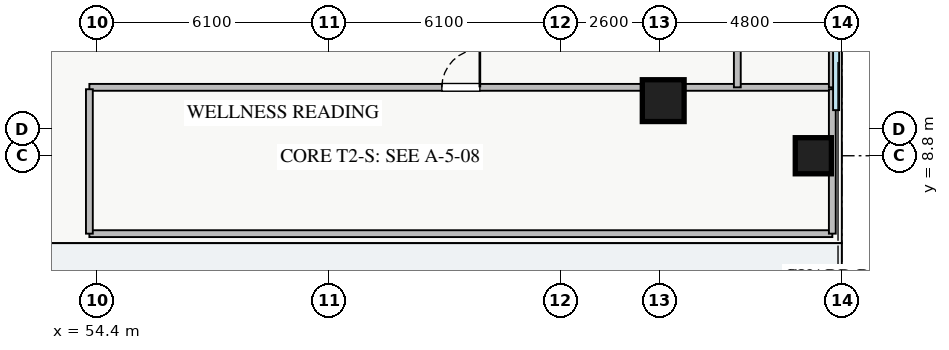
"""IFC4 building model, lengths in metres.
Left out: names, types, materials, properties, quantities, classifications, styles, units other than length and angle.
Written with IfcOpenShell. Run it as: python <this file> out.ifc"""

import sys

from ifc_helpers import new_model, si_unit, direction, frame, frame_2d, origin, origin_2d, place, context, subcontext, project, spatial, rectangle, extrude, source, transform, mapped, element, fill, save


model = new_model("IFC4")
c1 = context("Model", 3, precision=1e-05, world=origin(), true_north=direction((0.0, 1.0)))
c2 = subcontext(c1, "Body", "Model", "MODEL_VIEW")
j1 = project(units=[si_unit("LENGTHUNIT", "METRE"), si_unit("PLANEANGLEUNIT", "RADIAN")], contexts=[c1])
p1 = place(None, origin())
s1 = spatial("IfcSite", under=j1, at=p1, CompositionType="ELEMENT")
p2 = place(p1, origin())
s2 = spatial("IfcBuilding", under=s1, at=p2, CompositionType="ELEMENT")
p3 = place(p2, frame((0.0, 0.0, 18.2)))
s3 = spatial("IfcBuildingStorey", under=s2, at=p3, CompositionType="ELEMENT", Elevation=18.2)
m1 = source(origin(), c2, "Body", "SweptSolid", [
    extrude(rectangle(XDim=1.1, YDim=1.1, at=origin_2d()), origin(), (0.0, 0.0, 1.0), 4.8),
])
p4 = place(p3, frame((69.3, 10.25, 0.0), z_axis=(0.0, 0.0, 1.0), x_axis=(1.0, 0.0, 0.0)))
e1 = element("IfcColumn", 1, at=p4, inside=s3, PredefinedType="COLUMN", context=c2, shape_type="MappedRepresentation", body=[
    mapped(m1, transform((0.0, 0.0, 0.0), x_axis=(1.0, 0.0, 0.0), y_axis=(0.0, 1.0, 0.0), z_axis=(0.0, 0.0, 1.0), scale=1.0)),
])
m2 = source(origin(), c2, "Body", "SweptSolid", [
    extrude(rectangle(XDim=0.95, YDim=0.95, at=origin_2d()), origin(), (0.0, 0.0, 1.0), 4.8),
])
p5 = place(p3, frame((73.25, 8.8, 0.0), z_axis=(0.0, 0.0, 1.0), x_axis=(1.0, 0.0, 0.0)))
e2 = element("IfcColumn", 2, at=p5, inside=s3, PredefinedType="COLUMN", context=c2, shape_type="MappedRepresentation", body=[
    mapped(m2, transform((0.0, 0.0, 0.0), x_axis=(1.0, 0.0, 0.0), y_axis=(0.0, 1.0, 0.0), z_axis=(0.0, 0.0, 1.0), scale=1.0)),
])
p6 = place(p3, frame((54.2, 10.6, 0.0), z_axis=(0.0, 0.0, 1.0), x_axis=(1.0, 0.0, 0.0)))
e3 = element("IfcWall", 3, at=p6, inside=s3, PredefinedType="PARTITIONING", context=c2, shape_type="SweptSolid", body=[
    extrude(rectangle(XDim=19.55, YDim=0.18, at=frame_2d((9.775, 0.0))), origin(), (0.0, 0.0, 1.0), 4.62),
])
p7 = place(p6, frame((9.275, 0.0, 0.0)))
e4 = element("IfcOpeningElement", 4, at=p7, cuts=e3, PredefinedType="OPENING", context=c2, shape_type="SweptSolid", body=[
    extrude(rectangle(XDim=1.0, YDim=2.05, at=frame_2d((0.5, 1.025))), frame((0.0, 0.1, 0.0), z_axis=(0.0, -1.0, 0.0), x_axis=(1.0, 0.0, 0.0)), (0.0, 0.0, 1.0), 0.2),
])
p8 = place(p3, frame((71.25, 10.6, 0.0), z_axis=(0.0, 0.0, 1.0), x_axis=(0.0, 1.0, 0.0)))
e5 = element("IfcWall", 5, at=p8, inside=s3, PredefinedType="PARTITIONING", context=c2, shape_type="SweptSolid", body=[
    extrude(rectangle(XDim=24.8, YDim=0.18, at=frame_2d((12.4, 0.0))), origin(), (0.0, 0.0, 1.0), 4.62),
])
p9 = place(p8, frame((11.9, 0.0, 0.0)))
e6 = element("IfcOpeningElement", 6, at=p9, cuts=e5, PredefinedType="OPENING", context=c2, shape_type="SweptSolid", body=[
    extrude(rectangle(XDim=1.0, YDim=2.05, at=frame_2d((0.5, 1.025))), frame((0.0, 0.1, 0.0), z_axis=(0.0, -1.0, 0.0), x_axis=(1.0, 0.0, 0.0)), (0.0, 0.0, 1.0), 0.2),
])
p10 = place(p3, frame((73.75, 10.6, 0.0), z_axis=(0.0, 0.0, 1.0), x_axis=(0.0, 1.0, 0.0)))
e7 = element("IfcWall", 7, at=p10, inside=s3, PredefinedType="PARTITIONING", context=c2, shape_type="SweptSolid", body=[
    extrude(rectangle(XDim=24.8, YDim=0.18, at=frame_2d((12.4, 0.0))), origin(), (0.0, 0.0, 1.0), 4.62),
])
p11 = place(p3, frame((54.2, 6.75, 0.0), z_axis=(0.0, 0.0, 1.0), x_axis=(1.0, 0.0, 0.0)))
e8 = element("IfcWall", 8, at=p11, inside=s3, PredefinedType="PARTITIONING", context=c2, shape_type="SweptSolid", body=[
    extrude(rectangle(XDim=19.55, YDim=0.18, at=frame_2d((9.775, 0.0))), origin(), (0.0, 0.0, 1.0), 4.62),
])
for number, where, z_axis, x_axis in (
    (9, (54.2, 6.75, 0.0), (0.0, 0.0, 1.0), (0.0, 1.0, 0.0)),
    (10, (73.75, 6.75, 0.0), (0.0, 0.0, 1.0), (0.0, 1.0, 0.0)),
):
    element("IfcWall", number, at=place(p3, frame(where, z_axis=z_axis, x_axis=x_axis)), inside=s3, PredefinedType="PARTITIONING", context=c2, shape_type="SweptSolid", body=[
        extrude(rectangle(XDim=3.8, YDim=0.18, at=frame_2d((1.9, 0.0))), origin(), (0.0, 0.0, 1.0), 4.62),
    ])
m3 = source(origin(), c2, "Body", "SweptSolid", [
    extrude(rectangle(XDim=1.0, YDim=2.05, at=frame_2d((0.5, 1.025))), frame((0.0, 0.025, 0.0), z_axis=(0.0, -1.0, 0.0), x_axis=(1.0, 0.0, 0.0)), (0.0, 0.0, 1.0), 0.05),
])
p12 = place(p7, origin())
e11 = element("IfcDoor", 11, at=p12, inside=s3, OperationType="SINGLE_SWING_RIGHT", PredefinedType="DOOR", context=c2, shape_type="MappedRepresentation", body=[
    mapped(m3, transform((0.0, 0.0, 0.0), x_axis=(1.0, 0.0, 0.0), y_axis=(0.0, 1.0, 0.0), z_axis=(0.0, 0.0, 1.0), scale=1.0)),
])
fill(e4, e11)
save(model, sys.argv[1])
